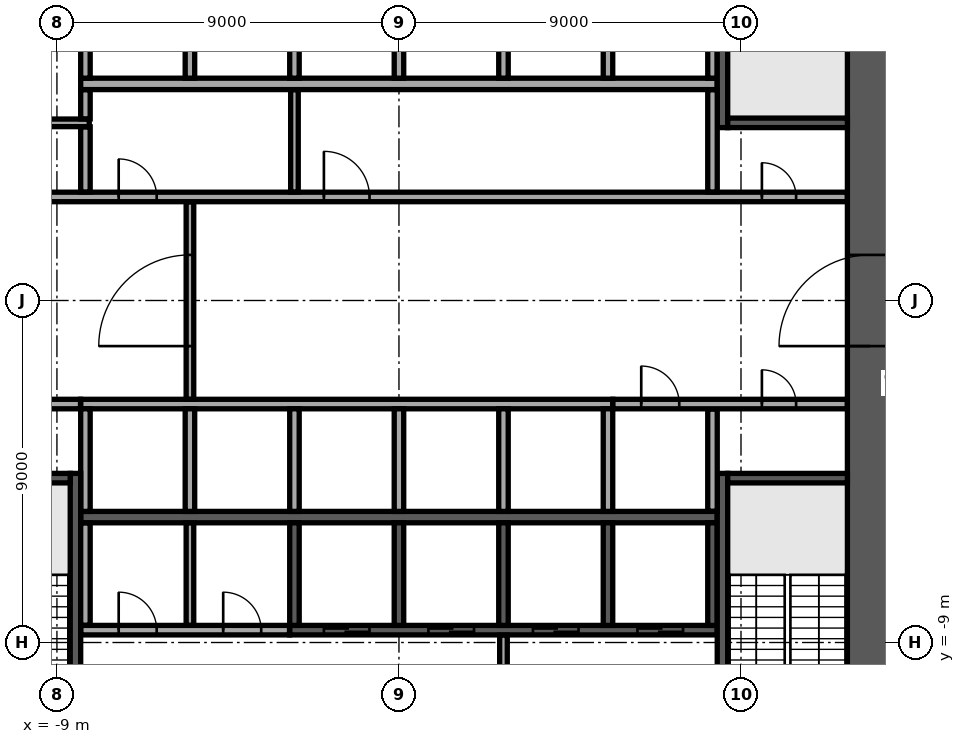
"""IFC4 building model, lengths in metres.
Left out: names, types, materials, properties, quantities, classifications, styles, units other than length and angle.
Written with IfcOpenShell. Run it as: python <this file> out.ifc"""

import sys

from ifc_helpers import new_model, si_unit, direction, frame, frame_2d, origin, place, context, subcontext, project, spatial, rectangle, extrude, element, fill, save


model = new_model("IFC4")
c1 = context("Model", 3, precision=1e-05, world=origin(), true_north=direction((0.0, 1.0)))
c2 = subcontext(c1, "Body", "Model", "MODEL_VIEW")
j1 = project(units=[si_unit("LENGTHUNIT", "METRE"), si_unit("PLANEANGLEUNIT", "RADIAN")], contexts=[c1])
p1 = place(None, origin())
s1 = spatial("IfcSite", under=j1, at=p1, CompositionType="ELEMENT")
p2 = place(p1, origin())
s2 = spatial("IfcBuilding", under=s1, at=p2, CompositionType="ELEMENT")
p3 = place(p2, frame((0.0, 0.0, 51.3)))
s3 = spatial("IfcBuildingStorey", under=s2, at=p3, CompositionType="ELEMENT", Elevation=51.3)
p4 = place(p3, frame((12.4, -11.8, 0.0), z_axis=(0.0, 0.0, 1.0), x_axis=(0.0, 1.0, 0.0)))
e1 = element("IfcWall", 1, at=p4, inside=s3, PredefinedType="SHEAR", context=c2, shape_type="SweptSolid", body=[
    extrude(rectangle(XDim=23.6, YDim=1.2, at=frame_2d((11.8, 0.0))), origin(), (0.0, 0.0, 1.0), 3.75),
])
p5 = place(p4, frame((10.6, 0.0, 0.0)))
e2 = element("IfcOpeningElement", 2, at=p5, cuts=e1, PredefinedType="OPENING", context=c2, shape_type="SweptSolid", body=[
    extrude(rectangle(XDim=2.4, YDim=2.4, at=frame_2d((1.2, 1.2))), frame((0.0, 0.61, 0.0), z_axis=(0.0, -1.0, 0.0), x_axis=(1.0, 0.0, 0.0)), (0.0, 0.0, 1.0), 1.22),
])
for number, where, z_axis, x_axis in (
    (3, (-8.375, 5.7, 0.0), (0.0, 0.0, 1.0), (1.0, 0.0, 0.0)),
    (4, (-8.375, -5.7, 0.0), (0.0, 0.0, 1.0), (1.0, 0.0, 0.0)),
):
    element("IfcWall", number, at=place(p3, frame(where, z_axis=z_axis, x_axis=x_axis)), inside=s3, PredefinedType="SOLIDWALL", context=c2, shape_type="SweptSolid", body=[
        extrude(rectangle(XDim=16.75, YDim=0.3, at=frame_2d((8.375, 0.0))), origin(), (0.0, 0.0, 1.0), 3.75),
    ])
for number, where, z_axis, x_axis in (
    (5, (-8.25, 5.85, 0.0), (0.0, 0.0, 1.0), (0.0, 1.0, 0.0)),
    (6, (-5.5, 5.85, 0.0), (0.0, 0.0, 1.0), (0.0, 1.0, 0.0)),
    (7, (-2.75, 5.85, 0.0), (0.0, 0.0, 1.0), (0.0, 1.0, 0.0)),
    (8, (0.0, 5.85, 0.0), (0.0, 0.0, 1.0), (0.0, 1.0, 0.0)),
    (9, (2.75, 5.85, 0.0), (0.0, 0.0, 1.0), (0.0, 1.0, 0.0)),
    (10, (5.5, 5.85, 0.0), (0.0, 0.0, 1.0), (0.0, 1.0, 0.0)),
    (11, (8.25, 5.85, 0.0), (0.0, 0.0, 1.0), (0.0, 1.0, 0.0)),
):
    element("IfcWall", number, at=place(p3, frame(where, z_axis=z_axis, x_axis=x_axis)), inside=s3, PredefinedType="SOLIDWALL", context=c2, shape_type="SweptSolid", body=[
        extrude(rectangle(XDim=2.7, YDim=0.25, at=frame_2d((1.35, 0.0))), origin(), (0.0, 0.0, 1.0), 3.75),
    ])
p6 = place(p3, frame((-8.375, -2.725, 0.0), z_axis=(0.0, 0.0, 1.0), x_axis=(1.0, 0.0, 0.0)))
e12 = element("IfcWall", 12, at=p6, inside=s3, PredefinedType="SOLIDWALL", context=c2, shape_type="SweptSolid", body=[
    extrude(rectangle(XDim=14.0, YDim=0.25, at=frame_2d((7.0, 0.0))), origin(), (0.0, 0.0, 1.0), 3.75),
])
for number, where, z_axis, x_axis in (
    (13, (-8.25, -5.55, 0.0), (0.0, 0.0, 1.0), (0.0, 1.0, 0.0)),
    (14, (-5.5, -5.55, 0.0), (0.0, 0.0, 1.0), (0.0, 1.0, 0.0)),
    (15, (-2.75, -5.55, 0.0), (0.0, 0.0, 1.0), (0.0, 1.0, 0.0)),
    (16, (0.0, -5.55, 0.0), (0.0, 0.0, 1.0), (0.0, 1.0, 0.0)),
    (17, (2.75, -5.55, 0.0), (0.0, 0.0, 1.0), (0.0, 1.0, 0.0)),
    (18, (5.5, -5.55, 0.0), (0.0, 0.0, 1.0), (0.0, 1.0, 0.0)),
):
    element("IfcWall", number, at=place(p3, frame(where, z_axis=z_axis, x_axis=x_axis)), inside=s3, PredefinedType="SOLIDWALL", context=c2, shape_type="SweptSolid", body=[
        extrude(rectangle(XDim=2.7, YDim=0.25, at=frame_2d((1.35, 0.0))), origin(), (0.0, 0.0, 1.0), 3.75),
    ])
p7 = place(p3, frame((-2.875, -8.675, 0.0), z_axis=(0.0, 0.0, 1.0), x_axis=(1.0, 0.0, 0.0)))
e19 = element("IfcWall", 19, at=p7, inside=s3, PredefinedType="SOLIDWALL", context=c2, shape_type="SweptSolid", body=[
    extrude(rectangle(XDim=11.25, YDim=0.25, at=frame_2d((5.625, 0.0))), origin(), (0.0, 0.0, 1.0), 3.75),
])
p8 = place(p7, frame((0.9, 0.0, 0.0)))
e20 = element("IfcOpeningElement", 20, at=p8, cuts=e19, PredefinedType="OPENING", context=c2, shape_type="SweptSolid", body=[
    extrude(rectangle(XDim=1.2, YDim=2.1, at=frame_2d((0.6, 1.05))), frame((0.0, 0.135, 0.0), z_axis=(0.0, -1.0, 0.0), x_axis=(1.0, 0.0, 0.0)), (0.0, 0.0, 1.0), 0.27),
])
p9 = place(p7, frame((3.65, 0.0, 0.0)))
e21 = element("IfcOpeningElement", 21, at=p9, cuts=e19, PredefinedType="OPENING", context=c2, shape_type="SweptSolid", body=[
    extrude(rectangle(XDim=1.2, YDim=2.1, at=frame_2d((0.6, 1.05))), frame((0.0, 0.135, 0.0), z_axis=(0.0, -1.0, 0.0), x_axis=(1.0, 0.0, 0.0)), (0.0, 0.0, 1.0), 0.27),
])
p10 = place(p7, frame((6.4, 0.0, 0.0)))
e22 = element("IfcOpeningElement", 22, at=p10, cuts=e19, PredefinedType="OPENING", context=c2, shape_type="SweptSolid", body=[
    extrude(rectangle(XDim=1.2, YDim=2.1, at=frame_2d((0.6, 1.05))), frame((0.0, 0.135, 0.0), z_axis=(0.0, -1.0, 0.0), x_axis=(1.0, 0.0, 0.0)), (0.0, 0.0, 1.0), 0.27),
])
p11 = place(p7, frame((9.15, 0.0, 0.0)))
e23 = element("IfcOpeningElement", 23, at=p11, cuts=e19, PredefinedType="OPENING", context=c2, shape_type="SweptSolid", body=[
    extrude(rectangle(XDim=1.2, YDim=2.1, at=frame_2d((0.6, 1.05))), frame((0.0, 0.135, 0.0), z_axis=(0.0, -1.0, 0.0), x_axis=(1.0, 0.0, 0.0)), (0.0, 0.0, 1.0), 0.27),
])
for number, where, z_axis, x_axis in (
    (24, (-2.75, -8.55, 0.0), (0.0, 0.0, 1.0), (0.0, 1.0, 0.0)),
    (25, (0.0, -8.55, 0.0), (0.0, 0.0, 1.0), (0.0, 1.0, 0.0)),
    (26, (2.75, -8.55, 0.0), (0.0, 0.0, 1.0), (0.0, 1.0, 0.0)),
    (27, (5.5, -8.55, 0.0), (0.0, 0.0, 1.0), (0.0, 1.0, 0.0)),
    (28, (8.25, -8.55, 0.0), (0.0, 0.0, 1.0), (0.0, 1.0, 0.0)),
):
    element("IfcWall", number, at=place(p3, frame(where, z_axis=z_axis, x_axis=x_axis)), inside=s3, PredefinedType="SOLIDWALL", context=c2, shape_type="SweptSolid", body=[
        extrude(rectangle(XDim=2.7, YDim=0.25, at=frame_2d((1.35, 0.0))), origin(), (0.0, 0.0, 1.0), 3.75),
    ])
p12 = place(p3, frame((8.512, 4.55, 0.0), z_axis=(0.0, 0.0, 1.0), x_axis=(0.0, 1.0, 0.0)))
e29 = element("IfcWall", 29, at=p12, inside=s3, PredefinedType="SOLIDWALL", context=c2, shape_type="SweptSolid", body=[
    extrude(rectangle(XDim=7.25, YDim=0.275, at=frame_2d((3.625, 0.0))), origin(), (0.0, 0.0, 1.0), 3.75),
])
p13 = place(p12, frame((6.0, 0.0, 0.0)))
e30 = element("IfcOpeningElement", 30, at=p13, cuts=e29, PredefinedType="OPENING", context=c2, shape_type="SweptSolid", body=[
    extrude(rectangle(XDim=1.0, YDim=2.1, at=frame_2d((0.5, 1.05))), frame((0.0, 0.147, 0.0), z_axis=(0.0, -1.0, 0.0), x_axis=(1.0, 0.0, 0.0)), (0.0, 0.0, 1.0), 0.295),
])
p14 = place(p3, frame((8.65, 4.675, 0.0), z_axis=(0.0, 0.0, 1.0), x_axis=(1.0, 0.0, 0.0)))
e31 = element("IfcWall", 31, at=p14, inside=s3, PredefinedType="SOLIDWALL", context=c2, shape_type="SweptSolid", body=[
    extrude(rectangle(XDim=3.15, YDim=0.25, at=frame_2d((1.575, 0.0))), origin(), (0.0, 0.0, 1.0), 3.75),
])
p15 = place(p3, frame((-8.512, -4.55, 0.0), z_axis=(0.0, 0.0, 1.0), x_axis=(0.0, -1.0, 0.0)))
e32 = element("IfcWall", 32, at=p15, inside=s3, PredefinedType="SOLIDWALL", context=c2, shape_type="SweptSolid", body=[
    extrude(rectangle(XDim=7.25, YDim=0.275, at=frame_2d((3.625, 0.0))), origin(), (0.0, 0.0, 1.0), 3.75),
])
p16 = place(p15, frame((6.0, 0.0, 0.0)))
e33 = element("IfcOpeningElement", 33, at=p16, cuts=e32, PredefinedType="OPENING", context=c2, shape_type="SweptSolid", body=[
    extrude(rectangle(XDim=1.0, YDim=2.1, at=frame_2d((0.5, 1.05))), frame((0.0, 0.147, 0.0), z_axis=(0.0, -1.0, 0.0), x_axis=(1.0, 0.0, 0.0)), (0.0, 0.0, 1.0), 0.295),
])
p17 = place(p3, frame((-8.65, -4.675, 0.0), z_axis=(0.0, 0.0, 1.0), x_axis=(-1.0, 0.0, 0.0)))
e34 = element("IfcWall", 34, at=p17, inside=s3, PredefinedType="SOLIDWALL", context=c2, shape_type="SweptSolid", body=[
    extrude(rectangle(XDim=3.15, YDim=0.25, at=frame_2d((1.575, 0.0))), origin(), (0.0, 0.0, 1.0), 3.75),
])
p18 = place(p3, frame((8.512, -4.55, 0.0), z_axis=(0.0, 0.0, 1.0), x_axis=(0.0, -1.0, 0.0)))
e35 = element("IfcWall", 35, at=p18, inside=s3, PredefinedType="SOLIDWALL", context=c2, shape_type="SweptSolid", body=[
    extrude(rectangle(XDim=7.25, YDim=0.275, at=frame_2d((3.625, 0.0))), origin(), (0.0, 0.0, 1.0), 3.75),
])
p19 = place(p18, frame((6.0, 0.0, 0.0)))
e36 = element("IfcOpeningElement", 36, at=p19, cuts=e35, PredefinedType="OPENING", context=c2, shape_type="SweptSolid", body=[
    extrude(rectangle(XDim=1.0, YDim=2.1, at=frame_2d((0.5, 1.05))), frame((0.0, 0.147, 0.0), z_axis=(0.0, -1.0, 0.0), x_axis=(1.0, 0.0, 0.0)), (0.0, 0.0, 1.0), 0.295),
])
p20 = place(p3, frame((8.65, -4.675, 0.0), z_axis=(0.0, 0.0, 1.0), x_axis=(1.0, 0.0, 0.0)))
e37 = element("IfcWall", 37, at=p20, inside=s3, PredefinedType="SOLIDWALL", context=c2, shape_type="SweptSolid", body=[
    extrude(rectangle(XDim=3.15, YDim=0.25, at=frame_2d((1.575, 0.0))), origin(), (0.0, 0.0, 1.0), 3.75),
])
p21 = place(p3, frame((2.75, -11.795, 0.0), z_axis=(0.0, 0.0, 1.0), x_axis=(0.0, 1.0, 0.0)))
e38 = element("IfcWall", 38, at=p21, inside=s3, PredefinedType="PARTITIONING", context=c2, shape_type="SweptSolid", body=[
    extrude(rectangle(XDim=2.99, YDim=0.2, at=frame_2d((1.495, 0.0))), origin(), (0.0, 0.0, 1.0), 3.75),
])
p22 = place(p3, frame((-8.37, -8.675, 0.0), z_axis=(0.0, 0.0, 1.0), x_axis=(1.0, 0.0, 0.0)))
e39 = element("IfcWall", 39, at=p22, inside=s3, PredefinedType="PARTITIONING", context=c2, shape_type="SweptSolid", body=[
    extrude(rectangle(XDim=5.49, YDim=0.25, at=frame_2d((2.745, 0.0))), origin(), (0.0, 0.0, 1.0), 3.75),
])
p23 = place(p22, frame((0.995, 0.0, 0.0)))
e40 = element("IfcOpeningElement", 40, at=p23, cuts=e39, PredefinedType="OPENING", context=c2, shape_type="SweptSolid", body=[
    extrude(rectangle(XDim=1.0, YDim=2.1, at=frame_2d((0.5, 1.05))), frame((0.0, 0.135, 0.0), z_axis=(0.0, -1.0, 0.0), x_axis=(1.0, 0.0, 0.0)), (0.0, 0.0, 1.0), 0.27),
])
p24 = place(p22, frame((3.745, 0.0, 0.0)))
e41 = element("IfcOpeningElement", 41, at=p24, cuts=e39, PredefinedType="OPENING", context=c2, shape_type="SweptSolid", body=[
    extrude(rectangle(XDim=1.0, YDim=2.1, at=frame_2d((0.5, 1.05))), frame((0.0, 0.135, 0.0), z_axis=(0.0, -1.0, 0.0), x_axis=(1.0, 0.0, 0.0)), (0.0, 0.0, 1.0), 0.27),
])
p25 = place(p3, frame((-8.25, -8.545, 0.0), z_axis=(0.0, 0.0, 1.0), x_axis=(0.0, 1.0, 0.0)))
e42 = element("IfcWall", 42, at=p25, inside=s3, PredefinedType="PARTITIONING", context=c2, shape_type="SweptSolid", body=[
    extrude(rectangle(XDim=2.69, YDim=0.25, at=frame_2d((1.345, 0.0))), origin(), (0.0, 0.0, 1.0), 3.75),
])
p26 = place(p3, frame((-5.5, -8.545, 0.0), z_axis=(0.0, 0.0, 1.0), x_axis=(0.0, 1.0, 0.0)))
e43 = element("IfcWall", 43, at=p26, inside=s3, PredefinedType="PARTITIONING", context=c2, shape_type="SweptSolid", body=[
    extrude(rectangle(XDim=2.69, YDim=0.2, at=frame_2d((1.345, 0.0))), origin(), (0.0, 0.0, 1.0), 3.75),
])
p27 = place(p3, frame((8.25, -5.545, 0.0), z_axis=(0.0, 0.0, 1.0), x_axis=(0.0, 1.0, 0.0)))
e44 = element("IfcWall", 44, at=p27, inside=s3, PredefinedType="PARTITIONING", context=c2, shape_type="SweptSolid", body=[
    extrude(rectangle(XDim=2.69, YDim=0.25, at=frame_2d((1.345, 0.0))), origin(), (0.0, 0.0, 1.0), 3.75),
])
p28 = place(p3, frame((-11.795, -2.725, 0.0), z_axis=(0.0, 0.0, 1.0), x_axis=(1.0, 0.0, 0.0)))
e45 = element("IfcWall", 45, at=p28, inside=s3, PredefinedType="PARTITIONING", context=c2, shape_type="SweptSolid", body=[
    extrude(rectangle(XDim=3.415, YDim=0.25, at=frame_2d((1.708, 0.0))), origin(), (0.0, 0.0, 1.0), 3.75),
])
p29 = place(p28, frame((1.295, 0.0, 0.0)))
e46 = element("IfcOpeningElement", 46, at=p29, cuts=e45, PredefinedType="OPENING", context=c2, shape_type="SweptSolid", body=[
    extrude(rectangle(XDim=1.0, YDim=2.1, at=frame_2d((0.5, 1.05))), frame((0.0, 0.135, 0.0), z_axis=(0.0, -1.0, 0.0), x_axis=(1.0, 0.0, 0.0)), (0.0, 0.0, 1.0), 0.27),
])
p30 = place(p3, frame((5.63, -2.725, 0.0), z_axis=(0.0, 0.0, 1.0), x_axis=(1.0, 0.0, 0.0)))
e47 = element("IfcWall", 47, at=p30, inside=s3, PredefinedType="PARTITIONING", context=c2, shape_type="SweptSolid", body=[
    extrude(rectangle(XDim=6.165, YDim=0.25, at=frame_2d((3.083, 0.0))), origin(), (0.0, 0.0, 1.0), 3.75),
])
p31 = place(p30, frame((0.745, 0.0, 0.0)))
e48 = element("IfcOpeningElement", 48, at=p31, cuts=e47, PredefinedType="OPENING", context=c2, shape_type="SweptSolid", body=[
    extrude(rectangle(XDim=1.0, YDim=2.1, at=frame_2d((0.5, 1.05))), frame((0.0, 0.135, 0.0), z_axis=(0.0, -1.0, 0.0), x_axis=(1.0, 0.0, 0.0)), (0.0, 0.0, 1.0), 0.27),
])
p32 = place(p30, frame((3.92, 0.0, 0.0)))
e49 = element("IfcOpeningElement", 49, at=p32, cuts=e47, PredefinedType="OPENING", context=c2, shape_type="SweptSolid", body=[
    extrude(rectangle(XDim=0.9, YDim=2.1, at=frame_2d((0.45, 1.05))), frame((0.0, 0.135, 0.0), z_axis=(0.0, -1.0, 0.0), x_axis=(1.0, 0.0, 0.0)), (0.0, 0.0, 1.0), 0.27),
])
p33 = place(p3, frame((-5.5, -2.595, 0.0), z_axis=(0.0, 0.0, 1.0), x_axis=(0.0, 1.0, 0.0)))
e50 = element("IfcWall", 50, at=p33, inside=s3, PredefinedType="PARTITIONING", context=c2, shape_type="SweptSolid", body=[
    extrude(rectangle(XDim=5.19, YDim=0.2, at=frame_2d((2.595, 0.0))), origin(), (0.0, 0.0, 1.0), 3.75),
])
p34 = place(p33, frame((1.395, 0.0, 0.0)))
e51 = element("IfcOpeningElement", 51, at=p34, cuts=e50, PredefinedType="OPENING", context=c2, shape_type="SweptSolid", body=[
    extrude(rectangle(XDim=2.4, YDim=2.4, at=frame_2d((1.2, 1.2))), frame((0.0, 0.11, 0.0), z_axis=(0.0, -1.0, 0.0), x_axis=(1.0, 0.0, 0.0)), (0.0, 0.0, 1.0), 0.22),
])
p35 = place(p3, frame((-11.795, 2.725, 0.0), z_axis=(0.0, 0.0, 1.0), x_axis=(1.0, 0.0, 0.0)))
e52 = element("IfcWall", 52, at=p35, inside=s3, PredefinedType="PARTITIONING", context=c2, shape_type="SweptSolid", body=[
    extrude(rectangle(XDim=23.59, YDim=0.25, at=frame_2d((11.795, 0.0))), origin(), (0.0, 0.0, 1.0), 3.75),
])
p36 = place(p35, frame((21.345, 0.0, 0.0)))
e53 = element("IfcOpeningElement", 53, at=p36, cuts=e52, PredefinedType="OPENING", context=c2, shape_type="SweptSolid", body=[
    extrude(rectangle(XDim=0.9, YDim=2.1, at=frame_2d((0.45, 1.05))), frame((0.0, 0.135, 0.0), z_axis=(0.0, -1.0, 0.0), x_axis=(1.0, 0.0, 0.0)), (0.0, 0.0, 1.0), 0.27),
])
p37 = place(p35, frame((1.345, 0.0, 0.0)))
e54 = element("IfcOpeningElement", 54, at=p37, cuts=e52, PredefinedType="OPENING", context=c2, shape_type="SweptSolid", body=[
    extrude(rectangle(XDim=0.9, YDim=2.1, at=frame_2d((0.45, 1.05))), frame((0.0, 0.135, 0.0), z_axis=(0.0, -1.0, 0.0), x_axis=(1.0, 0.0, 0.0)), (0.0, 0.0, 1.0), 0.27),
])
p38 = place(p35, frame((4.42, 0.0, 0.0)))
e55 = element("IfcOpeningElement", 55, at=p38, cuts=e52, PredefinedType="OPENING", context=c2, shape_type="SweptSolid", body=[
    extrude(rectangle(XDim=1.0, YDim=2.1, at=frame_2d((0.5, 1.05))), frame((0.0, 0.135, 0.0), z_axis=(0.0, -1.0, 0.0), x_axis=(1.0, 0.0, 0.0)), (0.0, 0.0, 1.0), 0.27),
])
p39 = place(p35, frame((9.82, 0.0, 0.0)))
e56 = element("IfcOpeningElement", 56, at=p39, cuts=e52, PredefinedType="OPENING", context=c2, shape_type="SweptSolid", body=[
    extrude(rectangle(XDim=1.2, YDim=2.1, at=frame_2d((0.6, 1.05))), frame((0.0, 0.135, 0.0), z_axis=(0.0, -1.0, 0.0), x_axis=(1.0, 0.0, 0.0)), (0.0, 0.0, 1.0), 0.27),
])
p40 = place(p3, frame((-8.25, 2.855, 0.0), z_axis=(0.0, 0.0, 1.0), x_axis=(0.0, 1.0, 0.0)))
e57 = element("IfcWall", 57, at=p40, inside=s3, PredefinedType="PARTITIONING", context=c2, shape_type="SweptSolid", body=[
    extrude(rectangle(XDim=1.715, YDim=0.25, at=frame_2d((0.857, 0.0))), origin(), (0.0, 0.0, 1.0), 3.75),
])
p41 = place(p3, frame((-2.75, 2.855, 0.0), z_axis=(0.0, 0.0, 1.0), x_axis=(0.0, 1.0, 0.0)))
e58 = element("IfcWall", 58, at=p41, inside=s3, PredefinedType="PARTITIONING", context=c2, shape_type="SweptSolid", body=[
    extrude(rectangle(XDim=2.69, YDim=0.2, at=frame_2d((1.345, 0.0))), origin(), (0.0, 0.0, 1.0), 3.75),
])
p42 = place(p3, frame((8.25, 2.855, 0.0), z_axis=(0.0, 0.0, 1.0), x_axis=(0.0, 1.0, 0.0)))
e59 = element("IfcWall", 59, at=p42, inside=s3, PredefinedType="PARTITIONING", context=c2, shape_type="SweptSolid", body=[
    extrude(rectangle(XDim=2.69, YDim=0.25, at=frame_2d((1.345, 0.0))), origin(), (0.0, 0.0, 1.0), 3.75),
])
p43 = place(p3, frame((-11.795, 4.675, 0.0), z_axis=(0.0, 0.0, 1.0), x_axis=(1.0, 0.0, 0.0)))
e60 = element("IfcWall", 60, at=p43, inside=s3, PredefinedType="PARTITIONING", context=c2, shape_type="SweptSolid", body=[
    extrude(rectangle(XDim=3.645, YDim=0.2, at=frame_2d((1.823, 0.0))), origin(), (0.0, 0.0, 1.0), 3.75),
])
p44 = place(p3, frame((-8.25, 4.78, 0.0), z_axis=(0.0, 0.0, 1.0), x_axis=(0.0, 1.0, 0.0)))
e61 = element("IfcWall", 61, at=p44, inside=s3, PredefinedType="PARTITIONING", context=c2, shape_type="SweptSolid", body=[
    extrude(rectangle(XDim=0.765, YDim=0.25, at=frame_2d((0.382, 0.0))), origin(), (0.0, 0.0, 1.0), 3.75),
])
p45 = place(p5, origin())
e62 = element("IfcDoor", 62, at=p45, inside=s3, OperationType="SINGLE_SWING_LEFT", PredefinedType="DOOR", context=c2, shape_type="SweptSolid", body=[
    extrude(rectangle(XDim=2.4, YDim=2.4, at=frame_2d((1.2, 1.2))), frame((0.0, 0.025, 0.0), z_axis=(0.0, -1.0, 0.0), x_axis=(1.0, 0.0, 0.0)), (0.0, 0.0, 1.0), 0.05),
])
fill(e2, e62)
p46 = place(p8, origin())
e63 = element("IfcDoor", 63, at=p46, inside=s3, OperationType="DOUBLE_DOOR_SLIDING", PredefinedType="DOOR", context=c2, shape_type="SweptSolid", body=[
    extrude(rectangle(XDim=1.2, YDim=2.1, at=frame_2d((0.6, 1.05))), frame((0.0, 0.025, 0.0), z_axis=(0.0, -1.0, 0.0), x_axis=(1.0, 0.0, 0.0)), (0.0, 0.0, 1.0), 0.05),
])
fill(e20, e63)
p47 = place(p9, origin())
e64 = element("IfcDoor", 64, at=p47, inside=s3, OperationType="DOUBLE_DOOR_SLIDING", PredefinedType="DOOR", context=c2, shape_type="SweptSolid", body=[
    extrude(rectangle(XDim=1.2, YDim=2.1, at=frame_2d((0.6, 1.05))), frame((0.0, 0.025, 0.0), z_axis=(0.0, -1.0, 0.0), x_axis=(1.0, 0.0, 0.0)), (0.0, 0.0, 1.0), 0.05),
])
fill(e21, e64)
p48 = place(p10, origin())
e65 = element("IfcDoor", 65, at=p48, inside=s3, OperationType="DOUBLE_DOOR_SLIDING", PredefinedType="DOOR", context=c2, shape_type="SweptSolid", body=[
    extrude(rectangle(XDim=1.2, YDim=2.1, at=frame_2d((0.6, 1.05))), frame((0.0, 0.025, 0.0), z_axis=(0.0, -1.0, 0.0), x_axis=(1.0, 0.0, 0.0)), (0.0, 0.0, 1.0), 0.05),
])
fill(e22, e65)
p49 = place(p11, origin())
e66 = element("IfcDoor", 66, at=p49, inside=s3, OperationType="DOUBLE_DOOR_SLIDING", PredefinedType="DOOR", context=c2, shape_type="SweptSolid", body=[
    extrude(rectangle(XDim=1.2, YDim=2.1, at=frame_2d((0.6, 1.05))), frame((0.0, 0.025, 0.0), z_axis=(0.0, -1.0, 0.0), x_axis=(1.0, 0.0, 0.0)), (0.0, 0.0, 1.0), 0.05),
])
fill(e23, e66)
p50 = place(p23, origin())
e67 = element("IfcDoor", 67, at=p50, inside=s3, OperationType="SINGLE_SWING_RIGHT", PredefinedType="DOOR", context=c2, shape_type="SweptSolid", body=[
    extrude(rectangle(XDim=1.0, YDim=2.1, at=frame_2d((0.5, 1.05))), frame((0.0, 0.025, 0.0), z_axis=(0.0, -1.0, 0.0), x_axis=(1.0, 0.0, 0.0)), (0.0, 0.0, 1.0), 0.05),
])
fill(e40, e67)
p51 = place(p24, origin())
e68 = element("IfcDoor", 68, at=p51, inside=s3, OperationType="SINGLE_SWING_RIGHT", PredefinedType="DOOR", context=c2, shape_type="SweptSolid", body=[
    extrude(rectangle(XDim=1.0, YDim=2.1, at=frame_2d((0.5, 1.05))), frame((0.0, 0.025, 0.0), z_axis=(0.0, -1.0, 0.0), x_axis=(1.0, 0.0, 0.0)), (0.0, 0.0, 1.0), 0.05),
])
fill(e41, e68)
p52 = place(p31, origin())
e69 = element("IfcDoor", 69, at=p52, inside=s3, OperationType="SINGLE_SWING_RIGHT", PredefinedType="DOOR", context=c2, shape_type="SweptSolid", body=[
    extrude(rectangle(XDim=1.0, YDim=2.1, at=frame_2d((0.5, 1.05))), frame((0.0, 0.025, 0.0), z_axis=(0.0, -1.0, 0.0), x_axis=(1.0, 0.0, 0.0)), (0.0, 0.0, 1.0), 0.05),
])
fill(e48, e69)
p53 = place(p36, origin())
e70 = element("IfcDoor", 70, at=p53, inside=s3, OperationType="SINGLE_SWING_RIGHT", PredefinedType="DOOR", context=c2, shape_type="SweptSolid", body=[
    extrude(rectangle(XDim=0.9, YDim=2.1, at=frame_2d((0.45, 1.05))), frame((0.0, 0.025, 0.0), z_axis=(0.0, -1.0, 0.0), x_axis=(1.0, 0.0, 0.0)), (0.0, 0.0, 1.0), 0.05),
])
fill(e53, e70)
p54 = place(p32, origin())
e71 = element("IfcDoor", 71, at=p54, inside=s3, OperationType="SINGLE_SWING_RIGHT", PredefinedType="DOOR", context=c2, shape_type="SweptSolid", body=[
    extrude(rectangle(XDim=0.9, YDim=2.1, at=frame_2d((0.45, 1.05))), frame((0.0, 0.025, 0.0), z_axis=(0.0, -1.0, 0.0), x_axis=(1.0, 0.0, 0.0)), (0.0, 0.0, 1.0), 0.05),
])
fill(e49, e71)
p55 = place(p38, origin())
e72 = element("IfcDoor", 72, at=p55, inside=s3, OperationType="SINGLE_SWING_RIGHT", PredefinedType="DOOR", context=c2, shape_type="SweptSolid", body=[
    extrude(rectangle(XDim=1.0, YDim=2.1, at=frame_2d((0.5, 1.05))), frame((0.0, 0.025, 0.0), z_axis=(0.0, -1.0, 0.0), x_axis=(1.0, 0.0, 0.0)), (0.0, 0.0, 1.0), 0.05),
])
fill(e55, e72)
p56 = place(p39, origin())
e73 = element("IfcDoor", 73, at=p56, inside=s3, OperationType="SINGLE_SWING_LEFT", PredefinedType="DOOR", context=c2, shape_type="SweptSolid", body=[
    extrude(rectangle(XDim=1.2, YDim=2.1, at=frame_2d((0.6, 1.05))), frame((0.0, 0.025, 0.0), z_axis=(0.0, -1.0, 0.0), x_axis=(1.0, 0.0, 0.0)), (0.0, 0.0, 1.0), 0.05),
])
fill(e56, e73)
p57 = place(p34, origin())
e74 = element("IfcDoor", 74, at=p57, inside=s3, OperationType="DOUBLE_DOOR_DOUBLE_SWING", PredefinedType="DOOR", context=c2, shape_type="SweptSolid", body=[
    extrude(rectangle(XDim=2.4, YDim=2.4, at=frame_2d((1.2, 1.2))), frame((0.0, 0.025, 0.0), z_axis=(0.0, -1.0, 0.0), x_axis=(1.0, 0.0, 0.0)), (0.0, 0.0, 1.0), 0.05),
])
fill(e51, e74)
save(model, sys.argv[1])
